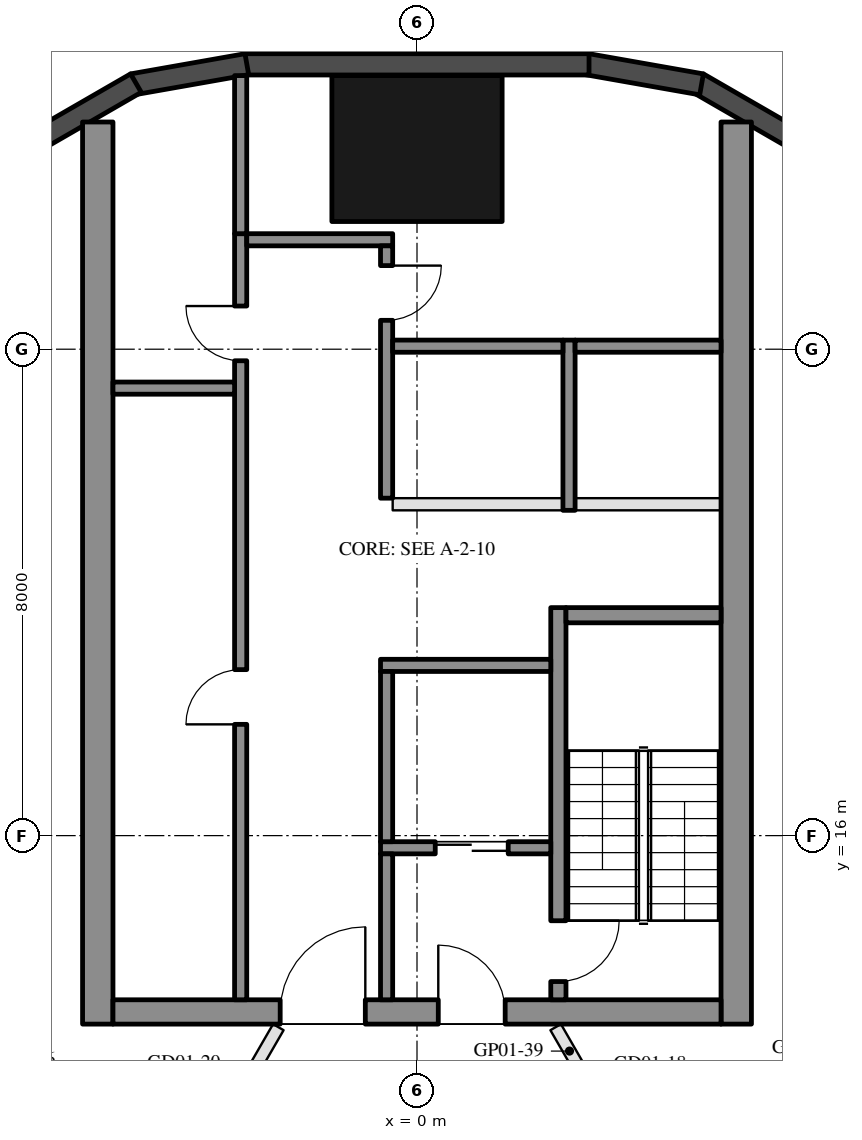
"""IFC4 building model, lengths in metres.
Left out: names, types, materials, properties, quantities, classifications, styles, units other than length and angle.
Written with IfcOpenShell. Run it as: python <this file> out.ifc"""

import sys

from ifc_helpers import new_model, si_unit, direction, frame, frame_2d, origin, origin_2d, place, context, subcontext, project, spatial, rectangle, hollow_rectangle, extrude, element, fill, save


model = new_model("IFC4")
c1 = context("Model", 3, precision=1e-05, world=origin(), true_north=direction((0.0, 1.0)))
c2 = subcontext(c1, "Body", "Model", "MODEL_VIEW")
j1 = project(units=[si_unit("LENGTHUNIT", "METRE"), si_unit("PLANEANGLEUNIT", "RADIAN")], contexts=[c1])
p1 = place(None, origin())
s1 = spatial("IfcSite", under=j1, at=p1, CompositionType="ELEMENT")
p2 = place(p1, origin())
s2 = spatial("IfcBuilding", under=s1, at=p2, CompositionType="ELEMENT")
p3 = place(p2, frame((0.0, 0.0, 50.2)))
s3 = spatial("IfcBuildingStorey", under=s2, at=p3, CompositionType="ELEMENT", Elevation=50.2)
p4 = place(p3, frame((0.0, 27.3, 0.0), z_axis=(0.0, 0.0, 1.0), x_axis=(1.0, 0.0, 0.0)))
e1 = element("IfcColumn", 1, at=p4, inside=s3, PredefinedType="COLUMN", context=c2, shape_type="SweptSolid", body=[
    extrude(hollow_rectangle(XDim=2.8, YDim=2.4, WallThickness=0.07, at=origin_2d()), origin(), (0.0, 0.0, 1.0), 3.7),
])
for number, where, z_axis, x_axis in (
    (2, (6.277, 27.422, 0.0), (0.0, 0.0, 1.0), (-0.866, 0.5, 0.0)),
    (3, (4.68, 28.356, 0.0), (0.0, 0.0, 1.0), (-0.985, 0.174, 0.0)),
):
    element("IfcWall", number, at=place(p3, frame(where, z_axis=z_axis, x_axis=x_axis)), inside=s3, PredefinedType="SOLIDWALL", context=c2, shape_type="SweptSolid", body=[
        extrude(rectangle(XDim=1.91, YDim=0.35, at=frame_2d((0.955, 0.0))), origin(), (0.0, 0.0, 1.0), 3.55),
    ])
p5 = place(p3, frame((2.829, 28.685, 0.0), z_axis=(0.0, 0.0, 1.0), x_axis=(-1.0, 0.0, 0.0)))
e4 = element("IfcWall", 4, at=p5, inside=s3, PredefinedType="SOLIDWALL", context=c2, shape_type="SweptSolid", body=[
    extrude(rectangle(XDim=5.658, YDim=0.35, at=frame_2d((2.829, 0.0))), origin(), (0.0, 0.0, 1.0), 3.55),
])
for number, where, z_axis, x_axis in (
    (5, (-2.799, 28.688, 0.0), (0.0, 0.0, 1.0), (-0.985, -0.174, 0.0)),
    (6, (-4.623, 28.377, 0.0), (0.0, 0.0, 1.0), (-0.866, -0.5, 0.0)),
):
    element("IfcWall", number, at=place(p3, frame(where, z_axis=z_axis, x_axis=x_axis)), inside=s3, PredefinedType="SOLIDWALL", context=c2, shape_type="SweptSolid", body=[
        extrude(rectangle(XDim=1.91, YDim=0.35, at=frame_2d((0.955, 0.0))), origin(), (0.0, 0.0, 1.0), 3.55),
    ])
for number, where, z_axis, x_axis in (
    (7, (5.25, 12.9, 0.0), (0.0, 0.0, 1.0), (0.0, 1.0, 0.0)),
    (8, (-5.25, 12.9, 0.0), (0.0, 0.0, 1.0), (0.0, 1.0, 0.0)),
):
    element("IfcWall", number, at=place(p3, frame(where, z_axis=z_axis, x_axis=x_axis)), inside=s3, PredefinedType="SHEAR", context=c2, shape_type="SweptSolid", body=[
        extrude(rectangle(XDim=14.837, YDim=0.5, at=frame_2d((7.418, 0.0))), origin(), (0.0, 0.0, 1.0), 3.5),
    ])
p6 = place(p3, frame((5.0, 13.1, 0.0), z_axis=(0.0, 0.0, 1.0), x_axis=(-1.0, 0.0, 0.0)))
e9 = element("IfcWall", 9, at=p6, inside=s3, PredefinedType="SHEAR", context=c2, shape_type="SweptSolid", body=[
    extrude(rectangle(XDim=10.0, YDim=0.4, at=frame_2d((5.0, 0.0))), origin(), (0.0, 0.0, 1.0), 3.5),
])
p7 = place(p6, frame((3.55, 0.0, 0.0)))
e10 = element("IfcOpeningElement", 10, at=p7, cuts=e9, PredefinedType="OPENING", context=c2, shape_type="SweptSolid", body=[
    extrude(rectangle(XDim=1.1, YDim=2.1, at=frame_2d((0.55, 1.05))), frame((0.0, 0.21, 0.0), z_axis=(0.0, -1.0, 0.0), x_axis=(1.0, 0.0, 0.0)), (0.0, 0.0, 1.0), 0.42),
])
p8 = place(p6, frame((5.85, 0.0, 0.0)))
e11 = element("IfcOpeningElement", 11, at=p8, cuts=e9, PredefinedType="OPENING", context=c2, shape_type="SweptSolid", body=[
    extrude(rectangle(XDim=1.4, YDim=2.1, at=frame_2d((0.7, 1.05))), frame((0.0, 0.21, 0.0), z_axis=(0.0, -1.0, 0.0), x_axis=(1.0, 0.0, 0.0)), (0.0, 0.0, 1.0), 0.42),
])
p9 = place(p3, frame((2.325, 13.3, 0.0), z_axis=(0.0, 0.0, 1.0), x_axis=(0.0, 1.0, 0.0)))
e12 = element("IfcWall", 12, at=p9, inside=s3, PredefinedType="SHEAR", context=c2, shape_type="SweptSolid", body=[
    extrude(rectangle(XDim=6.45, YDim=0.25, at=frame_2d((3.225, 0.0))), origin(), (0.0, 0.0, 1.0), 3.5),
])
p10 = place(p9, frame((0.3, 0.0, 0.0)))
e13 = element("IfcOpeningElement", 13, at=p10, cuts=e12, PredefinedType="OPENING", context=c2, shape_type="SweptSolid", body=[
    extrude(rectangle(XDim=1.0, YDim=2.1, at=frame_2d((0.5, 1.05))), frame((0.0, 0.135, 0.0), z_axis=(0.0, -1.0, 0.0), x_axis=(1.0, 0.0, 0.0)), (0.0, 0.0, 1.0), 0.27),
])
p11 = place(p3, frame((5.0, 19.625, 0.0), z_axis=(0.0, 0.0, 1.0), x_axis=(-1.0, 0.0, 0.0)))
e14 = element("IfcWall", 14, at=p11, inside=s3, PredefinedType="SHEAR", context=c2, shape_type="SweptSolid", body=[
    extrude(rectangle(XDim=2.55, YDim=0.25, at=frame_2d((1.275, 0.0))), origin(), (0.0, 0.0, 1.0), 3.5),
])
p12 = place(p3, frame((2.2, 18.8, 0.0), z_axis=(0.0, 0.0, 1.0), x_axis=(-1.0, 0.0, 0.0)))
e15 = element("IfcWall", 15, at=p12, inside=s3, PredefinedType="SHEAR", context=c2, shape_type="SweptSolid", body=[
    extrude(rectangle(XDim=2.8, YDim=0.2, at=frame_2d((1.4, 0.0))), origin(), (0.0, 0.0, 1.0), 3.5),
])
p13 = place(p3, frame((2.2, 15.8, 0.0), z_axis=(0.0, 0.0, 1.0), x_axis=(-1.0, 0.0, 0.0)))
e16 = element("IfcWall", 16, at=p13, inside=s3, PredefinedType="SHEAR", context=c2, shape_type="SweptSolid", body=[
    extrude(rectangle(XDim=2.8, YDim=0.2, at=frame_2d((1.4, 0.0))), origin(), (0.0, 0.0, 1.0), 3.5),
])
p14 = place(p13, frame((0.7, 0.0, 0.0)))
e17 = element("IfcOpeningElement", 17, at=p14, cuts=e16, PredefinedType="OPENING", context=c2, shape_type="SweptSolid", body=[
    extrude(rectangle(XDim=1.2, YDim=2.1, at=frame_2d((0.6, 1.05))), frame((0.0, 0.11, 0.0), z_axis=(0.0, -1.0, 0.0), x_axis=(1.0, 0.0, 0.0)), (0.0, 0.0, 1.0), 0.22),
])
p15 = place(p3, frame((-0.5, 15.9, 0.0), z_axis=(0.0, 0.0, 1.0), x_axis=(0.0, 1.0, 0.0)))
e18 = element("IfcWall", 18, at=p15, inside=s3, PredefinedType="SHEAR", context=c2, shape_type="SweptSolid", body=[
    extrude(rectangle(XDim=2.8, YDim=0.2, at=frame_2d((1.4, 0.0))), origin(), (0.0, 0.0, 1.0), 3.5),
])
p16 = place(p3, frame((-0.5, 13.3, 0.0), z_axis=(0.0, 0.0, 1.0), x_axis=(0.0, 1.0, 0.0)))
e19 = element("IfcWall", 19, at=p16, inside=s3, PredefinedType="SHEAR", context=c2, shape_type="SweptSolid", body=[
    extrude(rectangle(XDim=2.4, YDim=0.2, at=frame_2d((1.2, 0.0))), origin(), (0.0, 0.0, 1.0), 3.5),
])
p17 = place(p3, frame((-2.9, 13.3, 0.0), z_axis=(0.0, 0.0, 1.0), x_axis=(0.0, 1.0, 0.0)))
e20 = element("IfcWall", 20, at=p17, inside=s3, PredefinedType="SHEAR", context=c2, shape_type="SweptSolid", body=[
    extrude(rectangle(XDim=12.6, YDim=0.2, at=frame_2d((6.3, 0.0))), origin(), (0.0, 0.0, 1.0), 3.5),
])
p18 = place(p17, frame((4.53, 0.0, 0.0)))
e21 = element("IfcOpeningElement", 21, at=p18, cuts=e20, PredefinedType="OPENING", context=c2, shape_type="SweptSolid", body=[
    extrude(rectangle(XDim=0.9, YDim=2.1, at=frame_2d((0.45, 1.05))), frame((0.0, 0.11, 0.0), z_axis=(0.0, -1.0, 0.0), x_axis=(1.0, 0.0, 0.0)), (0.0, 0.0, 1.0), 0.22),
])
p19 = place(p17, frame((10.51, 0.0, 0.0)))
e22 = element("IfcOpeningElement", 22, at=p19, cuts=e20, PredefinedType="OPENING", context=c2, shape_type="SweptSolid", body=[
    extrude(rectangle(XDim=0.9, YDim=2.1, at=frame_2d((0.45, 1.05))), frame((0.0, 0.11, 0.0), z_axis=(0.0, -1.0, 0.0), x_axis=(1.0, 0.0, 0.0)), (0.0, 0.0, 1.0), 0.22),
])
p20 = place(p3, frame((-0.4, 25.8, 0.0), z_axis=(0.0, 0.0, 1.0), x_axis=(-1.0, 0.0, 0.0)))
e23 = element("IfcWall", 23, at=p20, inside=s3, PredefinedType="SHEAR", context=c2, shape_type="SweptSolid", body=[
    extrude(rectangle(XDim=2.4, YDim=0.2, at=frame_2d((1.2, 0.0))), origin(), (0.0, 0.0, 1.0), 3.5),
])
p21 = place(p3, frame((-0.5, 21.55, 0.0), z_axis=(0.0, 0.0, 1.0), x_axis=(0.0, 1.0, 0.0)))
e24 = element("IfcWall", 24, at=p21, inside=s3, PredefinedType="SHEAR", context=c2, shape_type="SweptSolid", body=[
    extrude(rectangle(XDim=4.15, YDim=0.2, at=frame_2d((2.075, 0.0))), origin(), (0.0, 0.0, 1.0), 3.5),
])
p22 = place(p21, frame((2.925, 0.0, 0.0)))
e25 = element("IfcOpeningElement", 25, at=p22, cuts=e24, PredefinedType="OPENING", context=c2, shape_type="SweptSolid", body=[
    extrude(rectangle(XDim=0.9, YDim=2.1, at=frame_2d((0.45, 1.05))), frame((0.0, 0.11, 0.0), z_axis=(0.0, -1.0, 0.0), x_axis=(1.0, 0.0, 0.0)), (0.0, 0.0, 1.0), 0.22),
])
p23 = place(p3, frame((-3.0, 23.36, 0.0), z_axis=(0.0, 0.0, 1.0), x_axis=(-1.0, 0.0, 0.0)))
e26 = element("IfcWall", 26, at=p23, inside=s3, PredefinedType="SHEAR", context=c2, shape_type="SweptSolid", body=[
    extrude(rectangle(XDim=2.0, YDim=0.2, at=frame_2d((1.0, 0.0))), origin(), (0.0, 0.0, 1.0), 3.5),
])
p24 = place(p3, frame((-2.9, 25.9, 0.0), z_axis=(0.0, 0.0, 1.0), x_axis=(0.0, 1.0, 0.0)))
e27 = element("IfcWall", 27, at=p24, inside=s3, PredefinedType="SHEAR", context=c2, shape_type="SweptSolid", body=[
    extrude(rectangle(XDim=2.6, YDim=0.2, at=frame_2d((1.3, 0.0))), origin(), (0.0, 0.0, 1.0), 3.5),
])
p25 = place(p3, frame((2.5, 21.35, 0.0), z_axis=(0.0, 0.0, 1.0), x_axis=(0.0, 1.0, 0.0)))
e28 = element("IfcWall", 28, at=p25, inside=s3, PredefinedType="SHEAR", context=c2, shape_type="SweptSolid", body=[
    extrude(rectangle(XDim=2.8, YDim=0.2, at=frame_2d((1.4, 0.0))), origin(), (0.0, 0.0, 1.0), 3.5),
])
p26 = place(p3, frame((5.0, 24.05, 0.0), z_axis=(0.0, 0.0, 1.0), x_axis=(-1.0, 0.0, 0.0)))
e29 = element("IfcWall", 29, at=p26, inside=s3, PredefinedType="SHEAR", context=c2, shape_type="SweptSolid", body=[
    extrude(rectangle(XDim=2.4, YDim=0.2, at=frame_2d((1.2, 0.0))), origin(), (0.0, 0.0, 1.0), 3.5),
])
p27 = place(p3, frame((2.4, 24.05, 0.0), z_axis=(0.0, 0.0, 1.0), x_axis=(-1.0, 0.0, 0.0)))
e30 = element("IfcWall", 30, at=p27, inside=s3, PredefinedType="SHEAR", context=c2, shape_type="SweptSolid", body=[
    extrude(rectangle(XDim=2.8, YDim=0.2, at=frame_2d((1.4, 0.0))), origin(), (0.0, 0.0, 1.0), 3.5),
])
p28 = place(p3, frame((5.0, 21.45, 0.0), z_axis=(0.0, 0.0, 1.0), x_axis=(-1.0, 0.0, 0.0)))
e31 = element("IfcWall", 31, at=p28, inside=s3, PredefinedType="PARTITIONING", context=c2, shape_type="SweptSolid", body=[
    extrude(rectangle(XDim=2.4, YDim=0.2, at=frame_2d((1.2, 0.0))), origin(), (0.0, 0.0, 1.0), 3.5),
])
p29 = place(p3, frame((2.4, 21.45, 0.0), z_axis=(0.0, 0.0, 1.0), x_axis=(-1.0, 0.0, 0.0)))
e32 = element("IfcWall", 32, at=p29, inside=s3, PredefinedType="PARTITIONING", context=c2, shape_type="SweptSolid", body=[
    extrude(rectangle(XDim=2.8, YDim=0.2, at=frame_2d((1.4, 0.0))), origin(), (0.0, 0.0, 1.0), 3.5),
])
p30 = place(p3, frame((13.647, 14.923, 0.0), z_axis=(0.0, 0.0, 1.0), x_axis=(-0.866027479907, -0.499996404033, 0.0)))
e33 = element("IfcWall", 33, at=p30, inside=s3, PredefinedType="PARTITIONING", context=c2, shape_type="SweptSolid", body=[
    extrude(rectangle(XDim=10.98, YDim=0.2, at=frame_2d((5.49, 0.0))), origin(), (0.0, 0.0, 1.0), 2.96),
])
p31 = place(p3, frame((-13.147, 13.989, 0.0), z_axis=(0.0, 0.0, 1.0), x_axis=(0.892898572595, -0.450257858408, 0.0)))
e34 = element("IfcWall", 34, at=p31, inside=s3, PredefinedType="PARTITIONING", context=c2, shape_type="SweptSolid", body=[
    extrude(rectangle(XDim=10.096, YDim=0.2, at=frame_2d((5.048, 0.0))), origin(), (0.0, 0.0, 1.0), 2.96),
])
p32 = place(p3, frame((2.281, 12.85, 0.0), z_axis=(0.0, 0.0, 1.0), x_axis=(0.499979074716, -0.866037484666, 0.0)))
e35 = element("IfcWall", 35, at=p32, inside=s3, PredefinedType="PARTITIONING", context=c2, shape_type="SweptSolid", body=[
    extrude(rectangle(XDim=3.788, YDim=0.2, at=frame_2d((1.894, 0.0))), origin(), (0.0, 0.0, 1.0), 2.95),
])
p33 = place(p32, frame((1.394, 0.0, 0.0)))
e36 = element("IfcOpeningElement", 36, at=p33, cuts=e35, PredefinedType="OPENING", context=c2, shape_type="SweptSolid", body=[
    extrude(rectangle(XDim=1.0, YDim=2.1, at=frame_2d((0.5, 1.05))), frame((0.0, 0.11, 0.0), z_axis=(0.0, -1.0, 0.0), x_axis=(1.0, 0.0, 0.0)), (0.0, 0.0, 1.0), 0.22),
])
p34 = place(p3, frame((-4.172, 9.574, 0.0), z_axis=(0.0, 0.0, 1.0), x_axis=(0.499985062256, 0.866034027923, 0.0)))
e37 = element("IfcWall", 37, at=p34, inside=s3, PredefinedType="PARTITIONING", context=c2, shape_type="SweptSolid", body=[
    extrude(rectangle(XDim=3.782, YDim=0.2, at=frame_2d((1.891, 0.0))), origin(), (0.0, 0.0, 1.0), 2.95),
])
p35 = place(p34, frame((1.391, 0.0, 0.0)))
e38 = element("IfcOpeningElement", 38, at=p35, cuts=e37, PredefinedType="OPENING", context=c2, shape_type="SweptSolid", body=[
    extrude(rectangle(XDim=1.0, YDim=2.1, at=frame_2d((0.5, 1.05))), frame((0.0, 0.11, 0.0), z_axis=(0.0, -1.0, 0.0), x_axis=(1.0, 0.0, 0.0)), (0.0, 0.0, 1.0), 0.22),
])
p36 = place(p14, origin())
e39 = element("IfcDoor", 39, at=p36, inside=s3, OperationType="DOUBLE_DOOR_SLIDING", PredefinedType="DOOR", context=c2, shape_type="SweptSolid", body=[
    extrude(rectangle(XDim=1.2, YDim=2.1, at=frame_2d((0.6, 1.05))), frame((0.0, 0.025, 0.0), z_axis=(0.0, -1.0, 0.0), x_axis=(1.0, 0.0, 0.0)), (0.0, 0.0, 1.0), 0.05),
])
fill(e17, e39)
p37 = place(p18, origin())
e40 = element("IfcDoor", 40, at=p37, inside=s3, OperationType="SINGLE_SWING_LEFT", PredefinedType="DOOR", context=c2, shape_type="SweptSolid", body=[
    extrude(rectangle(XDim=0.9, YDim=2.1, at=frame_2d((0.45, 1.05))), frame((0.0, 0.025, 0.0), z_axis=(0.0, -1.0, 0.0), x_axis=(1.0, 0.0, 0.0)), (0.0, 0.0, 1.0), 0.05),
])
fill(e21, e40)
p38 = place(p19, origin())
e41 = element("IfcDoor", 41, at=p38, inside=s3, OperationType="SINGLE_SWING_RIGHT", PredefinedType="DOOR", context=c2, shape_type="SweptSolid", body=[
    extrude(rectangle(XDim=0.9, YDim=2.1, at=frame_2d((0.45, 1.05))), frame((0.0, 0.025, 0.0), z_axis=(0.0, -1.0, 0.0), x_axis=(1.0, 0.0, 0.0)), (0.0, 0.0, 1.0), 0.05),
])
fill(e22, e41)
p39 = place(p22, frame((0.9, 0.0, 0.0), z_axis=(0.0, 0.0, 1.0), x_axis=(-1.0, 0.0, 0.0)))
e42 = element("IfcDoor", 42, at=p39, inside=s3, OperationType="SINGLE_SWING_LEFT", PredefinedType="DOOR", context=c2, shape_type="SweptSolid", body=[
    extrude(rectangle(XDim=0.9, YDim=2.1, at=frame_2d((0.45, 1.05))), frame((0.0, 0.025, 0.0), z_axis=(0.0, -1.0, 0.0), x_axis=(1.0, 0.0, 0.0)), (0.0, 0.0, 1.0), 0.05),
])
fill(e25, e42)
p40 = place(p7, frame((1.1, 0.0, 0.0), z_axis=(0.0, 0.0, 1.0), x_axis=(-1.0, 0.0, 0.0)))
e43 = element("IfcDoor", 43, at=p40, inside=s3, OperationType="SINGLE_SWING_LEFT", PredefinedType="DOOR", context=c2, shape_type="SweptSolid", body=[
    extrude(rectangle(XDim=1.1, YDim=2.1, at=frame_2d((0.55, 1.05))), frame((0.0, 0.025, 0.0), z_axis=(0.0, -1.0, 0.0), x_axis=(1.0, 0.0, 0.0)), (0.0, 0.0, 1.0), 0.05),
])
fill(e10, e43)
p41 = place(p8, frame((1.4, 0.0, 0.0), z_axis=(0.0, 0.0, 1.0), x_axis=(-1.0, 0.0, 0.0)))
e44 = element("IfcDoor", 44, at=p41, inside=s3, OperationType="DOUBLE_DOOR_SINGLE_SWING", PredefinedType="DOOR", context=c2, shape_type="SweptSolid", body=[
    extrude(rectangle(XDim=1.4, YDim=2.1, at=frame_2d((0.7, 1.05))), frame((0.0, 0.025, 0.0), z_axis=(0.0, -1.0, 0.0), x_axis=(1.0, 0.0, 0.0)), (0.0, 0.0, 1.0), 0.05),
])
fill(e11, e44)
p42 = place(p10, frame((1.0, 0.0, 0.0), z_axis=(0.0, 0.0, 1.0), x_axis=(-1.0, 0.0, 0.0)))
e45 = element("IfcDoor", 45, at=p42, inside=s3, OperationType="SINGLE_SWING_LEFT", PredefinedType="DOOR", context=c2, shape_type="SweptSolid", body=[
    extrude(rectangle(XDim=1.0, YDim=2.1, at=frame_2d((0.5, 1.05))), frame((0.0, 0.025, 0.0), z_axis=(0.0, -1.0, 0.0), x_axis=(1.0, 0.0, 0.0)), (0.0, 0.0, 1.0), 0.05),
])
fill(e13, e45)
save(model, sys.argv[1])
